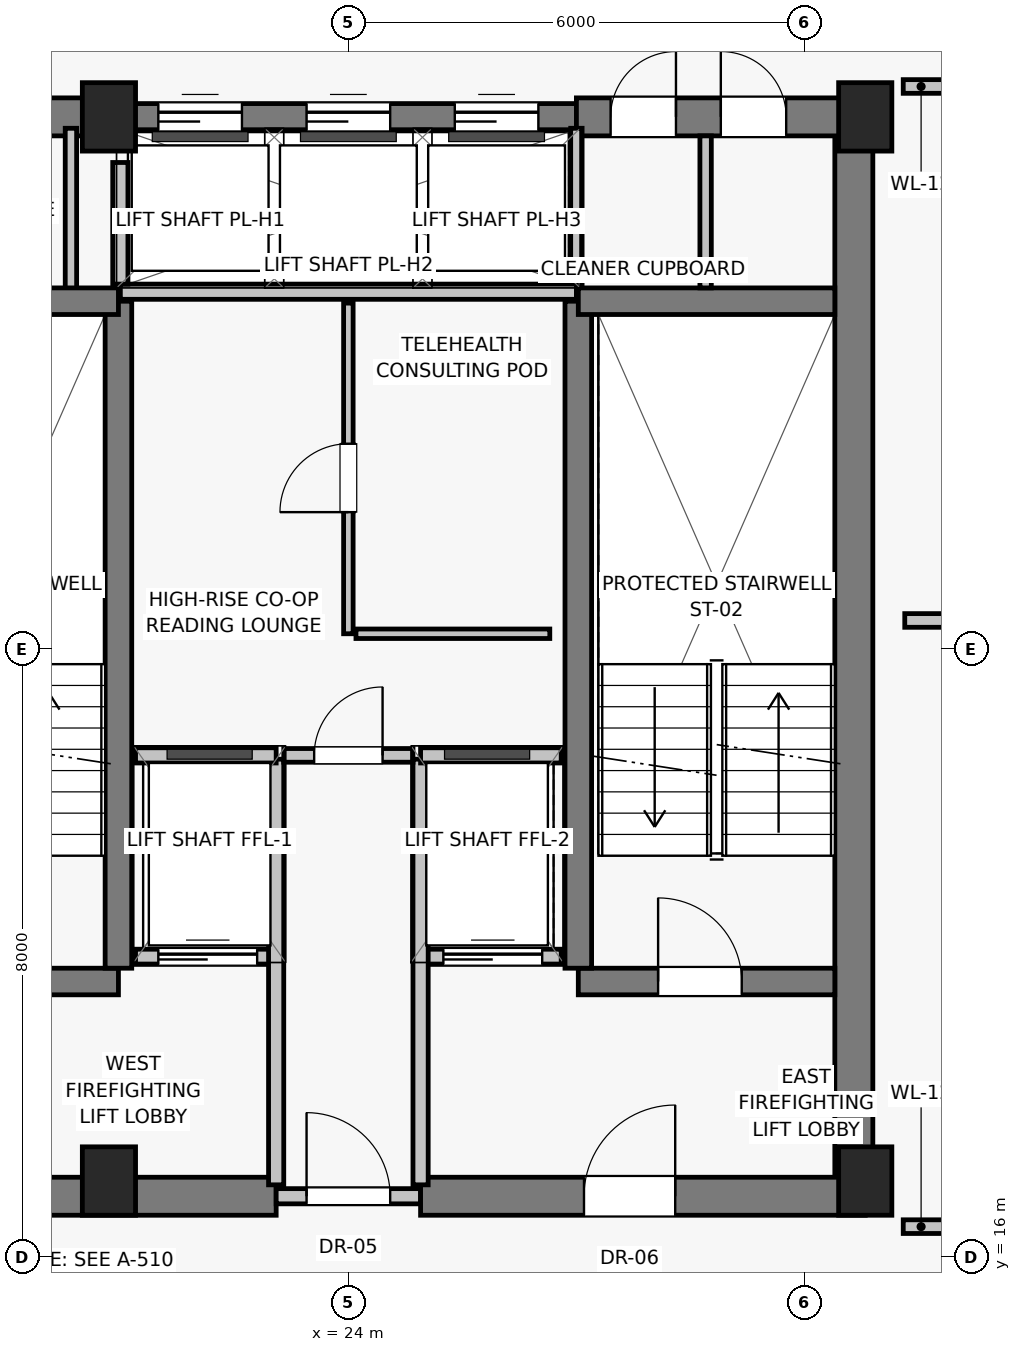
"""IFC4 building model, lengths in metres.
Left out: names, types, materials, properties, quantities, classifications, styles, units other than length and angle.
Written with IfcOpenShell. Run it as: python <this file> out.ifc"""

import sys

from ifc_helpers import new_model, si_unit, direction, frame, frame_2d, origin, origin_2d, place, context, subcontext, project, spatial, rectangle, extrude, source, transform, mapped, element, fill, save


model = new_model("IFC4")
c1 = context("Model", 3, precision=1e-05, world=origin(), true_north=direction((0.0, 1.0)))
c2 = subcontext(c1, "Body", "Model", "MODEL_VIEW")
j1 = project(units=[si_unit("LENGTHUNIT", "METRE"), si_unit("PLANEANGLEUNIT", "RADIAN")], contexts=[c1])
p1 = place(None, origin())
s1 = spatial("IfcSite", under=j1, at=p1, CompositionType="ELEMENT")
p2 = place(p1, origin())
s2 = spatial("IfcBuilding", under=s1, at=p2, CompositionType="ELEMENT")
p3 = place(p2, frame((0.0, 0.0, 257.75)))
s3 = spatial("IfcBuildingStorey", under=s2, at=p3, CompositionType="ELEMENT", Elevation=257.75)
for number, where, z_axis, x_axis in (
    (1, (20.85, 17.0, 0.0), (0.0, 0.0, 1.0), (1.0, 0.0, 0.0)),
    (2, (30.8, 17.0, 0.0), (0.0, 0.0, 1.0), (1.0, 0.0, 0.0)),
    (3, (20.85, 31.0, 0.0), (0.0, 0.0, 1.0), (1.0, 0.0, 0.0)),
    (4, (30.8, 31.0, 0.0), (0.0, 0.0, 1.0), (1.0, 0.0, 0.0)),
):
    element("IfcColumn", number, at=place(p3, frame(where, z_axis=z_axis, x_axis=x_axis)), inside=s3, PredefinedType="PILASTER", context=c2, shape_type="SweptSolid", body=[
        extrude(rectangle(XDim=0.7, YDim=0.9, at=origin_2d()), origin(), (0.0, 0.0, 1.0), 3.25),
    ])
p4 = place(p3, frame((30.65, 16.8, 0.0), z_axis=(0.0, 0.0, 1.0), x_axis=(0.0, 1.0, 0.0)))
e5 = element("IfcWall", 5, at=p4, inside=s3, PredefinedType="SHEAR", context=c2, shape_type="SweptSolid", body=[
    extrude(rectangle(XDim=14.2, YDim=0.5, at=frame_2d((7.1, 0.0))), origin(), (0.0, 0.0, 1.0), 3.015),
])
p5 = place(p3, frame((17.2, 16.8, 0.0), z_axis=(0.0, 0.0, 1.0), x_axis=(1.0, 0.0, 0.0)))
e6 = element("IfcWall", 6, at=p5, inside=s3, PredefinedType="SHEAR", context=c2, shape_type="SweptSolid", body=[
    extrude(rectangle(XDim=5.85, YDim=0.5, at=frame_2d((2.925, 0.0))), origin(), (0.0, 0.0, 1.0), 3.015),
])
p6 = place(p5, frame((1.15, 0.0, 0.0)))
e7 = element("IfcOpeningElement", 7, at=p6, cuts=e6, PredefinedType="OPENING", context=c2, shape_type="SweptSolid", body=[
    extrude(rectangle(XDim=1.2, YDim=2.03, at=frame_2d((0.6, 1.015))), frame((0.0, 0.26, 0.0), z_axis=(0.0, -1.0, 0.0), x_axis=(1.0, 0.0, 0.0)), (0.0, 0.0, 1.0), 0.52),
])
p7 = place(p3, frame((23.05, 16.8, 0.0), z_axis=(0.0, 0.0, 1.0), x_axis=(1.0, 0.0, 0.0)))
e8 = element("IfcWall", 8, at=p7, inside=s3, PredefinedType="SOLIDWALL", context=c2, shape_type="SweptSolid", body=[
    extrude(rectangle(XDim=1.9, YDim=0.2, at=frame_2d((0.95, 0.0))), origin(), (0.0, 0.0, 1.0), 2.165),
])
p8 = place(p7, frame((0.4, 0.0, 0.0)))
e9 = element("IfcOpeningElement", 9, at=p8, cuts=e8, PredefinedType="OPENING", context=c2, shape_type="SweptSolid", body=[
    extrude(rectangle(XDim=1.1, YDim=2.03, at=frame_2d((0.55, 1.015))), frame((0.0, 0.11, 0.0), z_axis=(0.0, -1.0, 0.0), x_axis=(1.0, 0.0, 0.0)), (0.0, 0.0, 1.0), 0.22),
])
p9 = place(p3, frame((24.95, 16.8, 0.0), z_axis=(0.0, 0.0, 1.0), x_axis=(1.0, 0.0, 0.0)))
e10 = element("IfcWall", 10, at=p9, inside=s3, PredefinedType="SHEAR", context=c2, shape_type="SweptSolid", body=[
    extrude(rectangle(XDim=5.85, YDim=0.5, at=frame_2d((2.925, 0.0))), origin(), (0.0, 0.0, 1.0), 3.015),
])
p10 = place(p9, frame((2.15, 0.0, 0.0)))
e11 = element("IfcOpeningElement", 11, at=p10, cuts=e10, PredefinedType="OPENING", context=c2, shape_type="SweptSolid", body=[
    extrude(rectangle(XDim=1.2, YDim=2.03, at=frame_2d((0.6, 1.015))), frame((0.0, 0.26, 0.0), z_axis=(0.0, -1.0, 0.0), x_axis=(1.0, 0.0, 0.0)), (0.0, 0.0, 1.0), 0.52),
])
p11 = place(p3, frame((17.2, 31.0, 0.0), z_axis=(0.0, 0.0, 1.0), x_axis=(1.0, 0.0, 0.0)))
e12 = element("IfcWall", 12, at=p11, inside=s3, PredefinedType="SHEAR", context=c2, shape_type="SweptSolid", body=[
    extrude(rectangle(XDim=3.8, YDim=0.5, at=frame_2d((1.9, 0.0))), origin(), (0.0, 0.0, 1.0), 3.015),
])
p12 = place(p11, frame((1.25, 0.0, 0.0)))
e13 = element("IfcOpeningElement", 13, at=p12, cuts=e12, PredefinedType="OPENING", context=c2, shape_type="SweptSolid", body=[
    extrude(rectangle(XDim=0.86, YDim=2.01, at=frame_2d((0.43, 1.005))), frame((0.0, 0.26, 0.0), z_axis=(0.0, -1.0, 0.0), x_axis=(1.0, 0.0, 0.0)), (0.0, 0.0, 1.0), 0.52),
])
p13 = place(p3, frame((21.0, 31.0, 0.0), z_axis=(0.0, 0.0, 1.0), x_axis=(1.0, 0.0, 0.0)))
e14 = element("IfcWall", 14, at=p13, inside=s3, PredefinedType="SHEAR", context=c2, shape_type="SweptSolid", body=[
    extrude(rectangle(XDim=6.0, YDim=0.35, at=frame_2d((3.0, 0.0))), origin(), (0.0, 0.0, 1.0), 3.015),
])
p14 = place(p13, frame((0.5, 0.0, 0.0)))
e15 = element("IfcOpeningElement", 15, at=p14, cuts=e14, PredefinedType="OPENING", context=c2, shape_type="SweptSolid", body=[
    extrude(rectangle(XDim=1.1, YDim=2.08, at=frame_2d((0.55, 1.04))), frame((0.0, 0.185, 0.0), z_axis=(0.0, -1.0, 0.0), x_axis=(1.0, 0.0, 0.0)), (0.0, 0.0, 1.0), 0.37),
])
p15 = place(p13, frame((2.45, 0.0, 0.0)))
e16 = element("IfcOpeningElement", 16, at=p15, cuts=e14, PredefinedType="OPENING", context=c2, shape_type="SweptSolid", body=[
    extrude(rectangle(XDim=1.1, YDim=2.08, at=frame_2d((0.55, 1.04))), frame((0.0, 0.185, 0.0), z_axis=(0.0, -1.0, 0.0), x_axis=(1.0, 0.0, 0.0)), (0.0, 0.0, 1.0), 0.37),
])
p16 = place(p13, frame((4.4, 0.0, 0.0)))
e17 = element("IfcOpeningElement", 17, at=p16, cuts=e14, PredefinedType="OPENING", context=c2, shape_type="SweptSolid", body=[
    extrude(rectangle(XDim=1.1, YDim=2.08, at=frame_2d((0.55, 1.04))), frame((0.0, 0.185, 0.0), z_axis=(0.0, -1.0, 0.0), x_axis=(1.0, 0.0, 0.0)), (0.0, 0.0, 1.0), 0.37),
])
p17 = place(p3, frame((27.0, 31.0, 0.0), z_axis=(0.0, 0.0, 1.0), x_axis=(1.0, 0.0, 0.0)))
e18 = element("IfcWall", 18, at=p17, inside=s3, PredefinedType="SHEAR", context=c2, shape_type="SweptSolid", body=[
    extrude(rectangle(XDim=3.8, YDim=0.5, at=frame_2d((1.9, 0.0))), origin(), (0.0, 0.0, 1.0), 3.015),
])
p18 = place(p17, frame((0.45, 0.0, 0.0)))
e19 = element("IfcOpeningElement", 19, at=p18, cuts=e18, PredefinedType="OPENING", context=c2, shape_type="SweptSolid", body=[
    extrude(rectangle(XDim=0.86, YDim=2.01, at=frame_2d((0.43, 1.005))), frame((0.0, 0.26, 0.0), z_axis=(0.0, -1.0, 0.0), x_axis=(1.0, 0.0, 0.0)), (0.0, 0.0, 1.0), 0.52),
])
p19 = place(p17, frame((1.9, 0.0, 0.0)))
e20 = element("IfcOpeningElement", 20, at=p19, cuts=e18, PredefinedType="OPENING", context=c2, shape_type="SweptSolid", body=[
    extrude(rectangle(XDim=0.86, YDim=2.01, at=frame_2d((0.43, 1.005))), frame((0.0, 0.26, 0.0), z_axis=(0.0, -1.0, 0.0), x_axis=(1.0, 0.0, 0.0)), (0.0, 0.0, 1.0), 0.52),
])
for number, where, z_axis, x_axis in (
    (21, (20.35, 28.65, 0.0), (0.0, 0.0, 1.0), (0.0, 1.0, 0.0)),
    (22, (27.0, 28.65, 0.0), (0.0, 0.0, 1.0), (0.0, 1.0, 0.0)),
):
    element("IfcWall", number, at=place(p3, frame(where, z_axis=z_axis, x_axis=x_axis)), inside=s3, PredefinedType="PARTITIONING", context=c2, shape_type="SweptSolid", body=[
        extrude(rectangle(XDim=2.2, YDim=0.15, at=frame_2d((1.1, 0.0))), origin(), (0.0, 0.0, 1.0), 3.015),
    ])
p20 = place(p3, frame((17.6, 19.625, 0.0), z_axis=(0.0, 0.0, 1.0), x_axis=(1.0, 0.0, 0.0)))
e23 = element("IfcWall", 23, at=p20, inside=s3, PredefinedType="SHEAR", context=c2, shape_type="SweptSolid", body=[
    extrude(rectangle(XDim=3.375, YDim=0.35, at=frame_2d((1.688, 0.0))), origin(), (0.0, 0.0, 1.0), 3.015),
])
p21 = place(p20, frame((1.05, 0.0, 0.0)))
e24 = element("IfcOpeningElement", 24, at=p21, cuts=e23, PredefinedType="OPENING", context=c2, shape_type="SweptSolid", body=[
    extrude(rectangle(XDim=1.1, YDim=2.03, at=frame_2d((0.55, 1.015))), frame((0.0, 0.185, 0.0), z_axis=(0.0, -1.0, 0.0), x_axis=(1.0, 0.0, 0.0)), (0.0, 0.0, 1.0), 0.37),
])
p22 = place(p3, frame((21.2, 19.95, 0.0), z_axis=(0.0, 0.0, 1.0), x_axis=(1.0, 0.0, 0.0)))
e25 = element("IfcWall", 25, at=p22, inside=s3, PredefinedType="SOLIDWALL", context=c2, shape_type="SweptSolid", body=[
    extrude(rectangle(XDim=1.85, YDim=0.2, at=frame_2d((0.925, 0.0))), origin(), (0.0, 0.0, 1.0), 3.015),
])
p23 = place(p22, frame((0.3, 0.0, 0.0)))
e26 = element("IfcOpeningElement", 26, at=p23, cuts=e25, PredefinedType="OPENING", context=c2, shape_type="SweptSolid", body=[
    extrude(rectangle(XDim=1.3, YDim=2.25, at=frame_2d((0.65, 1.125))), frame((0.0, 0.11, 0.0), z_axis=(0.0, -1.0, 0.0), x_axis=(1.0, 0.0, 0.0)), (0.0, 0.0, 1.0), 0.22),
])
p24 = place(p3, frame((24.95, 19.95, 0.0), z_axis=(0.0, 0.0, 1.0), x_axis=(1.0, 0.0, 0.0)))
e27 = element("IfcWall", 27, at=p24, inside=s3, PredefinedType="SOLIDWALL", context=c2, shape_type="SweptSolid", body=[
    extrude(rectangle(XDim=1.85, YDim=0.2, at=frame_2d((0.925, 0.0))), origin(), (0.0, 0.0, 1.0), 3.015),
])
p25 = place(p24, frame((0.3, 0.0, 0.0)))
e28 = element("IfcOpeningElement", 28, at=p25, cuts=e27, PredefinedType="OPENING", context=c2, shape_type="SweptSolid", body=[
    extrude(rectangle(XDim=1.3, YDim=2.25, at=frame_2d((0.65, 1.125))), frame((0.0, 0.11, 0.0), z_axis=(0.0, -1.0, 0.0), x_axis=(1.0, 0.0, 0.0)), (0.0, 0.0, 1.0), 0.22),
])
p26 = place(p3, frame((27.025, 19.625, 0.0), z_axis=(0.0, 0.0, 1.0), x_axis=(1.0, 0.0, 0.0)))
e29 = element("IfcWall", 29, at=p26, inside=s3, PredefinedType="SHEAR", context=c2, shape_type="SweptSolid", body=[
    extrude(rectangle(XDim=3.375, YDim=0.35, at=frame_2d((1.688, 0.0))), origin(), (0.0, 0.0, 1.0), 3.015),
])
p27 = place(p26, frame((1.05, 0.0, 0.0)))
e30 = element("IfcOpeningElement", 30, at=p27, cuts=e29, PredefinedType="OPENING", context=c2, shape_type="SweptSolid", body=[
    extrude(rectangle(XDim=1.1, YDim=2.03, at=frame_2d((0.55, 1.015))), frame((0.0, 0.185, 0.0), z_axis=(0.0, -1.0, 0.0), x_axis=(1.0, 0.0, 0.0)), (0.0, 0.0, 1.0), 0.37),
])
for number, where, z_axis, x_axis in (
    (31, (20.975, 19.8, 0.0), (0.0, 0.0, 1.0), (0.0, 1.0, 0.0)),
    (32, (27.025, 19.8, 0.0), (0.0, 0.0, 1.0), (0.0, 1.0, 0.0)),
):
    element("IfcWall", number, at=place(p3, frame(where, z_axis=z_axis, x_axis=x_axis)), inside=s3, PredefinedType="SHEAR", context=c2, shape_type="SweptSolid", body=[
        extrude(rectangle(XDim=8.775, YDim=0.35, at=frame_2d((4.387, 0.0))), origin(), (0.0, 0.0, 1.0), 3.015),
    ])
for number, where, z_axis, x_axis in (
    (33, (17.6, 28.575, 0.0), (0.0, 0.0, 1.0), (1.0, 0.0, 0.0)),
    (34, (27.025, 28.575, 0.0), (0.0, 0.0, 1.0), (1.0, 0.0, 0.0)),
):
    element("IfcWall", number, at=place(p3, frame(where, z_axis=z_axis, x_axis=x_axis)), inside=s3, PredefinedType="SHEAR", context=c2, shape_type="SweptSolid", body=[
        extrude(rectangle(XDim=3.375, YDim=0.35, at=frame_2d((1.688, 0.0))), origin(), (0.0, 0.0, 1.0), 3.015),
    ])
for number, where, z_axis, x_axis in (
    (35, (23.05, 16.95, 0.0), (0.0, 0.0, 1.0), (0.0, 1.0, 0.0)),
    (36, (24.95, 16.95, 0.0), (0.0, 0.0, 1.0), (0.0, 1.0, 0.0)),
):
    element("IfcWall", number, at=place(p3, frame(where, z_axis=z_axis, x_axis=x_axis)), inside=s3, PredefinedType="SOLIDWALL", context=c2, shape_type="SweptSolid", body=[
        extrude(rectangle(XDim=5.6, YDim=0.2, at=frame_2d((2.8, 0.0))), origin(), (0.0, 0.0, 1.0), 3.015),
    ])
for number, where, z_axis, x_axis in (
    (37, (21.2, 22.6, 0.0), (0.0, 0.0, 1.0), (1.0, 0.0, 0.0)),
    (38, (24.95, 22.6, 0.0), (0.0, 0.0, 1.0), (1.0, 0.0, 0.0)),
):
    element("IfcWall", number, at=place(p3, frame(where, z_axis=z_axis, x_axis=x_axis)), inside=s3, PredefinedType="SOLIDWALL", context=c2, shape_type="SweptSolid", body=[
        extrude(rectangle(XDim=1.85, YDim=0.2, at=frame_2d((0.925, 0.0))), origin(), (0.0, 0.0, 1.0), 3.015),
    ])
p28 = place(p3, frame((21.0, 28.7, 0.0), z_axis=(0.0, 0.0, 1.0), x_axis=(1.0, 0.0, 0.0)))
e39 = element("IfcWall", 39, at=p28, inside=s3, PredefinedType="SOLIDWALL", context=c2, shape_type="SweptSolid", body=[
    extrude(rectangle(XDim=6.0, YDim=0.2, at=frame_2d((3.0, 0.0))), origin(), (0.0, 0.0, 1.0), 3.015),
])
p29 = place(p3, frame((21.0, 28.8, 0.0), z_axis=(0.0, 0.0, 1.0), x_axis=(0.0, 1.0, 0.0)))
e40 = element("IfcWall", 40, at=p29, inside=s3, PredefinedType="SOLIDWALL", context=c2, shape_type="SweptSolid", body=[
    extrude(rectangle(XDim=1.6, YDim=0.2, at=frame_2d((0.8, 0.0))), origin(), (0.0, 0.0, 1.0), 3.015),
])
p30 = place(p3, frame((23.15, 22.6, 0.0), z_axis=(0.0, 0.0, 1.0), x_axis=(1.0, 0.0, 0.0)))
e41 = element("IfcWall", 41, at=p30, inside=s3, PredefinedType="PARTITIONING", context=c2, shape_type="SweptSolid", body=[
    extrude(rectangle(XDim=1.7, YDim=0.18, at=frame_2d((0.85, 0.0))), origin(), (0.0, 0.0, 1.0), 3.015),
])
p31 = place(p30, frame((0.4, 0.0, 0.0)))
e42 = element("IfcOpeningElement", 42, at=p31, cuts=e41, PredefinedType="OPENING", context=c2, shape_type="SweptSolid", body=[
    extrude(rectangle(XDim=0.9, YDim=2.01, at=frame_2d((0.45, 1.005))), frame((0.0, 0.1, 0.0), z_axis=(0.0, -1.0, 0.0), x_axis=(1.0, 0.0, 0.0)), (0.0, 0.0, 1.0), 0.2),
])
p32 = place(p3, frame((24.1, 24.2, 0.0), z_axis=(0.0, 0.0, 1.0), x_axis=(1.0, 0.0, 0.0)))
e43 = element("IfcWall", 43, at=p32, inside=s3, PredefinedType="PARTITIONING", context=c2, shape_type="SweptSolid", body=[
    extrude(rectangle(XDim=2.55, YDim=0.125, at=frame_2d((1.275, 0.0))), origin(), (0.0, 0.0, 1.0), 3.015),
])
p33 = place(p3, frame((24.0, 24.2, 0.0), z_axis=(0.0, 0.0, 1.0), x_axis=(0.0, 1.0, 0.0)))
e44 = element("IfcWall", 44, at=p33, inside=s3, PredefinedType="PARTITIONING", context=c2, shape_type="SweptSolid", body=[
    extrude(rectangle(XDim=4.35, YDim=0.125, at=frame_2d((2.175, 0.0))), origin(), (0.0, 0.0, 1.0), 3.015),
])
p34 = place(p33, frame((1.6, 0.0, 0.0)))
e45 = element("IfcOpeningElement", 45, at=p34, cuts=e44, PredefinedType="OPENING", context=c2, shape_type="SweptSolid", body=[
    extrude(rectangle(XDim=0.9, YDim=2.01, at=frame_2d((0.45, 1.005))), frame((0.0, 0.073, 0.0), z_axis=(0.0, -1.0, 0.0), x_axis=(1.0, 0.0, 0.0)), (0.0, 0.0, 1.0), 0.145),
])
p35 = place(p3, frame((28.7, 28.75, 0.0), z_axis=(0.0, 0.0, 1.0), x_axis=(0.0, 1.0, 0.0)))
e46 = element("IfcWall", 46, at=p35, inside=s3, PredefinedType="PARTITIONING", context=c2, shape_type="SweptSolid", body=[
    extrude(rectangle(XDim=2.0, YDim=0.15, at=frame_2d((1.0, 0.0))), origin(), (0.0, 0.0, 1.0), 3.015),
])
p36 = place(p3, frame((31.32, 24.375, 0.0), z_axis=(0.0, 0.0, 1.0), x_axis=(1.0, 0.0, 0.0)))
e47 = element("IfcWall", 47, at=p36, inside=s3, PredefinedType="PARTITIONING", context=c2, shape_type="SweptSolid", body=[
    extrude(rectangle(XDim=9.789, YDim=0.18, at=frame_2d((4.895, 0.0))), origin(), (0.0, 0.0, 1.0), 3.015),
])
p37 = place(p3, frame((31.3, 16.4, 0.0), z_axis=(0.0, 0.0, 1.0), x_axis=(1.0, 0.0, 0.0)))
e48 = element("IfcWall", 48, at=p37, inside=s3, PredefinedType="PARTITIONING", context=c2, shape_type="SweptSolid", body=[
    extrude(rectangle(XDim=1.92, YDim=0.18, at=frame_2d((0.96, 0.0))), origin(), (0.0, 0.0, 1.0), 3.015),
])
p38 = place(p37, frame((0.72, 0.0, 0.0)))
e49 = element("IfcOpeningElement", 49, at=p38, cuts=e48, PredefinedType="OPENING", context=c2, shape_type="SweptSolid", body=[
    extrude(rectangle(XDim=1.0, YDim=2.01, at=frame_2d((0.5, 1.005))), frame((0.0, 0.1, 0.0), z_axis=(0.0, -1.0, 0.0), x_axis=(1.0, 0.0, 0.0)), (0.0, 0.0, 1.0), 0.2),
])
p39 = place(p3, frame((31.3, 31.4, 0.0), z_axis=(0.0, 0.0, 1.0), x_axis=(1.0, 0.0, 0.0)))
e50 = element("IfcWall", 50, at=p39, inside=s3, PredefinedType="PARTITIONING", context=c2, shape_type="SweptSolid", body=[
    extrude(rectangle(XDim=1.92, YDim=0.18, at=frame_2d((0.96, 0.0))), origin(), (0.0, 0.0, 1.0), 3.015),
])
p40 = place(p39, frame((0.72, 0.0, 0.0)))
e51 = element("IfcOpeningElement", 51, at=p40, cuts=e50, PredefinedType="OPENING", context=c2, shape_type="SweptSolid", body=[
    extrude(rectangle(XDim=1.0, YDim=2.01, at=frame_2d((0.5, 1.005))), frame((0.0, 0.1, 0.0), z_axis=(0.0, -1.0, 0.0), x_axis=(1.0, 0.0, 0.0)), (0.0, 0.0, 1.0), 0.2),
])
m1 = source(origin(), c2, "Body", "SweptSolid", [
    extrude(rectangle(XDim=1.1, YDim=2.03, at=frame_2d((0.55, 1.015))), frame((0.0, 0.025, 0.0), z_axis=(0.0, -1.0, 0.0), x_axis=(1.0, 0.0, 0.0)), (0.0, 0.0, 1.0), 0.05),
])
p41 = place(p8, origin())
e52 = element("IfcDoor", 52, at=p41, inside=s3, OperationType="SINGLE_SWING_LEFT", PredefinedType="DOOR", context=c2, shape_type="MappedRepresentation", body=[
    mapped(m1, transform((0.0, 0.0, 0.0), scale=1.0)),
])
fill(e9, e52)
m2 = source(origin(), c2, "Body", "SweptSolid", [
    extrude(rectangle(XDim=1.2, YDim=2.03, at=frame_2d((0.6, 1.015))), frame((0.0, 0.025, 0.0), z_axis=(0.0, -1.0, 0.0), x_axis=(1.0, 0.0, 0.0)), (0.0, 0.0, 1.0), 0.05),
])
p42 = place(p10, origin())
e53 = element("IfcDoor", 53, at=p42, inside=s3, OperationType="SINGLE_SWING_RIGHT", PredefinedType="DOOR", context=c2, shape_type="MappedRepresentation", body=[
    mapped(m2, transform((0.0, 0.0, 0.0), scale=1.0)),
])
fill(e11, e53)
m3 = source(origin(), c2, "Body", "SweptSolid", [
    extrude(rectangle(XDim=1.1, YDim=2.08, at=frame_2d((0.55, 1.04))), frame((0.0, 0.025, 0.0), z_axis=(0.0, -1.0, 0.0), x_axis=(1.0, 0.0, 0.0)), (0.0, 0.0, 1.0), 0.05),
])
p43 = place(p14, origin())
e54 = element("IfcDoor", 54, at=p43, inside=s3, OperationType="SLIDING_TO_LEFT", PredefinedType="DOOR", context=c2, shape_type="MappedRepresentation", body=[
    mapped(m3, transform((0.0, 0.0, 0.0), scale=1.0)),
])
fill(e15, e54)
p44 = place(p15, origin())
e55 = element("IfcDoor", 55, at=p44, inside=s3, OperationType="SLIDING_TO_LEFT", PredefinedType="DOOR", context=c2, shape_type="MappedRepresentation", body=[
    mapped(m3, transform((0.0, 0.0, 0.0), scale=1.0)),
])
fill(e16, e55)
p45 = place(p16, origin())
e56 = element("IfcDoor", 56, at=p45, inside=s3, OperationType="SLIDING_TO_LEFT", PredefinedType="DOOR", context=c2, shape_type="MappedRepresentation", body=[
    mapped(m3, transform((0.0, 0.0, 0.0), scale=1.0)),
])
fill(e17, e56)
m4 = source(origin(), c2, "Body", "SweptSolid", [
    extrude(rectangle(XDim=0.86, YDim=2.01, at=frame_2d((0.43, 1.005))), frame((0.0, 0.025, 0.0), z_axis=(0.0, -1.0, 0.0), x_axis=(1.0, 0.0, 0.0)), (0.0, 0.0, 1.0), 0.05),
])
p46 = place(p18, origin())
e57 = element("IfcDoor", 57, at=p46, inside=s3, OperationType="SINGLE_SWING_RIGHT", PredefinedType="DOOR", context=c2, shape_type="MappedRepresentation", body=[
    mapped(m4, transform((0.0, 0.0, 0.0), scale=1.0)),
])
fill(e19, e57)
p47 = place(p19, origin())
e58 = element("IfcDoor", 58, at=p47, inside=s3, OperationType="SINGLE_SWING_LEFT", PredefinedType="DOOR", context=c2, shape_type="MappedRepresentation", body=[
    mapped(m4, transform((0.0, 0.0, 0.0), scale=1.0)),
])
fill(e20, e58)
m5 = source(origin(), c2, "Body", "SweptSolid", [
    extrude(rectangle(XDim=1.3, YDim=2.25, at=frame_2d((0.65, 1.125))), frame((0.0, 0.025, 0.0), z_axis=(0.0, -1.0, 0.0), x_axis=(1.0, 0.0, 0.0)), (0.0, 0.0, 1.0), 0.05),
])
p48 = place(p23, origin())
e59 = element("IfcDoor", 59, at=p48, inside=s3, OperationType="SLIDING_TO_LEFT", PredefinedType="DOOR", context=c2, shape_type="MappedRepresentation", body=[
    mapped(m5, transform((0.0, 0.0, 0.0), scale=1.0)),
])
fill(e26, e59)
p49 = place(p25, origin())
e60 = element("IfcDoor", 60, at=p49, inside=s3, OperationType="SLIDING_TO_LEFT", PredefinedType="DOOR", context=c2, shape_type="MappedRepresentation", body=[
    mapped(m5, transform((0.0, 0.0, 0.0), scale=1.0)),
])
fill(e28, e60)
p50 = place(p27, origin())
e61 = element("IfcDoor", 61, at=p50, inside=s3, OperationType="SINGLE_SWING_LEFT", PredefinedType="DOOR", context=c2, shape_type="MappedRepresentation", body=[
    mapped(m1, transform((0.0, 0.0, 0.0), scale=1.0)),
])
fill(e30, e61)
m6 = source(origin(), c2, "Body", "SweptSolid", [
    extrude(rectangle(XDim=0.9, YDim=2.01, at=frame_2d((0.45, 1.005))), frame((0.0, 0.025, 0.0), z_axis=(0.0, -1.0, 0.0), x_axis=(1.0, 0.0, 0.0)), (0.0, 0.0, 1.0), 0.05),
])
p51 = place(p31, origin())
e62 = element("IfcDoor", 62, at=p51, inside=s3, OperationType="SINGLE_SWING_RIGHT", PredefinedType="DOOR", context=c2, shape_type="MappedRepresentation", body=[
    mapped(m6, transform((0.0, 0.0, 0.0), scale=1.0)),
])
fill(e42, e62)
p52 = place(p34, origin())
e63 = element("IfcDoor", 63, at=p52, inside=s3, OperationType="SINGLE_SWING_LEFT", PredefinedType="DOOR", context=c2, shape_type="MappedRepresentation", body=[
    mapped(m6, transform((0.0, 0.0, 0.0), scale=1.0)),
])
fill(e45, e63)
save(model, sys.argv[1])
